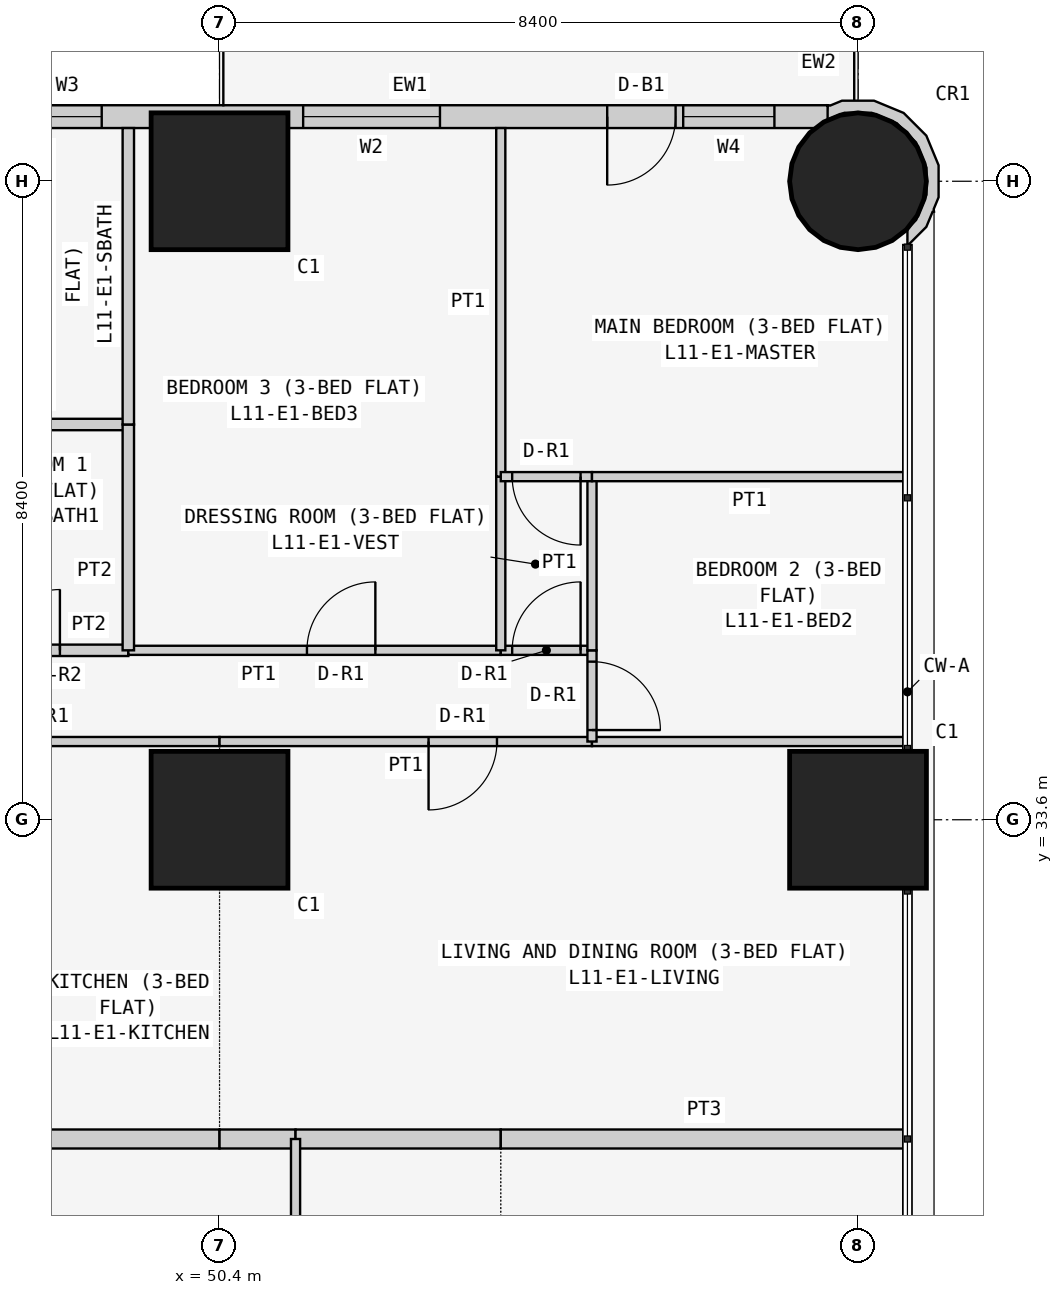
"""IFC4 building model, lengths in metres.
Left out: names, types, materials, properties, quantities, classifications, styles, units other than length and angle.
Written with IfcOpenShell. Run it as: python <this file> out.ifc"""

import sys

from ifc_helpers import new_model, si_unit, direction, frame, frame_2d, origin, origin_2d, place, context, subcontext, project, spatial, polyline, rectangle, circle, outline, extrude, element, fill, save


model = new_model("IFC4")
c1 = context("Model", 3, precision=1e-05, world=origin(), true_north=direction((0.0, 1.0)))
c2 = subcontext(c1, "Body", "Model", "MODEL_VIEW")
j1 = project(units=[si_unit("LENGTHUNIT", "METRE"), si_unit("PLANEANGLEUNIT", "RADIAN")], contexts=[c1])
p1 = place(None, origin())
s1 = spatial("IfcSite", under=j1, at=p1, CompositionType="ELEMENT")
p2 = place(p1, origin())
s2 = spatial("IfcBuilding", under=s1, at=p2, CompositionType="ELEMENT")
p3 = place(p2, frame((0.0, 0.0, 48.9)))
s3 = spatial("IfcBuildingStorey", under=s2, at=p3, CompositionType="ELEMENT", Elevation=48.9)
for number, where, z_axis, x_axis in (
    (1, (50.4, 33.6, 0.0), (0.0, 0.0, 1.0), (1.0, 0.0, 0.0)),
    (2, (50.4, 42.0, 0.0), (0.0, 0.0, 1.0), (1.0, 0.0, 0.0)),
    (3, (58.8, 33.6, 0.0), (0.0, 0.0, 1.0), (1.0, 0.0, 0.0)),
):
    element("IfcColumn", number, at=place(p3, frame(where, z_axis=z_axis, x_axis=x_axis)), inside=s3, PredefinedType="COLUMN", context=c2, shape_type="SweptSolid", body=[
        extrude(rectangle(XDim=1.8, YDim=1.8, at=origin_2d()), origin(), (0.0, 0.0, 1.0), 3.6),
    ])
p4 = place(p3, frame((58.8, 42.0, 0.0), z_axis=(0.0, 0.0, 1.0), x_axis=(1.0, 0.0, 0.0)))
e4 = element("IfcColumn", 4, at=p4, inside=s3, PredefinedType="COLUMN", context=c2, shape_type="SweptSolid", body=[
    extrude(circle(Radius=0.9, at=origin_2d()), origin(), (0.0, 0.0, 1.0), 3.6),
])
p5 = place(p3, frame((58.4, 42.85, 0.0), z_axis=(0.0, 0.0, 1.0), x_axis=(-1.0, 0.0, 0.0)))
e5 = element("IfcWall", 5, at=p5, inside=s3, PredefinedType="SOLIDWALL", context=c2, shape_type="SweptSolid", body=[
    extrude(rectangle(XDim=15.7, YDim=0.3, at=frame_2d((7.85, 0.0))), origin(), (0.0, 0.0, 1.0), 3.45),
])
p6 = place(p5, frame((12.4, 0.0, 0.9)))
e6 = element("IfcOpeningElement", 6, at=p6, cuts=e5, PredefinedType="OPENING", context=c2, shape_type="SweptSolid", body=[
    extrude(rectangle(XDim=1.8, YDim=1.5, at=frame_2d((0.9, 0.75))), frame((0.0, 0.16, 0.0), z_axis=(0.0, -1.0, 0.0), x_axis=(1.0, 0.0, 0.0)), (0.0, 0.0, 1.0), 0.32),
])
p7 = place(p5, frame((9.55, 0.0, 1.5)))
e7 = element("IfcOpeningElement", 7, at=p7, cuts=e5, PredefinedType="OPENING", context=c2, shape_type="SweptSolid", body=[
    extrude(rectangle(XDim=0.9, YDim=0.7, at=frame_2d((0.45, 0.35))), frame((0.0, 0.16, 0.0), z_axis=(0.0, -1.0, 0.0), x_axis=(1.0, 0.0, 0.0)), (0.0, 0.0, 1.0), 0.32),
])
p8 = place(p5, frame((5.1, 0.0, 0.9)))
e8 = element("IfcOpeningElement", 8, at=p8, cuts=e5, PredefinedType="OPENING", context=c2, shape_type="SweptSolid", body=[
    extrude(rectangle(XDim=1.8, YDim=1.5, at=frame_2d((0.9, 0.75))), frame((0.0, 0.16, 0.0), z_axis=(0.0, -1.0, 0.0), x_axis=(1.0, 0.0, 0.0)), (0.0, 0.0, 1.0), 0.32),
])
p9 = place(p5, frame((2.0, 0.0, 0.0)))
e9 = element("IfcOpeningElement", 9, at=p9, cuts=e5, PredefinedType="OPENING", context=c2, shape_type="SweptSolid", body=[
    extrude(rectangle(XDim=0.9, YDim=2.4, at=frame_2d((0.45, 1.2))), frame((0.0, 0.16, 0.0), z_axis=(0.0, -1.0, 0.0), x_axis=(1.0, 0.0, 0.0)), (0.0, 0.0, 1.0), 0.32),
])
p10 = place(p5, frame((0.7, 0.0, 0.9)))
e10 = element("IfcOpeningElement", 10, at=p10, cuts=e5, PredefinedType="OPENING", context=c2, shape_type="SweptSolid", body=[
    extrude(rectangle(XDim=1.2, YDim=1.5, at=frame_2d((0.6, 0.75))), frame((0.0, 0.16, 0.0), z_axis=(0.0, -1.0, 0.0), x_axis=(1.0, 0.0, 0.0)), (0.0, 0.0, 1.0), 0.32),
])
p11 = place(p3, frame((59.411, 41.233, 0.0), z_axis=(0.0, 0.0, 1.0), x_axis=(0.926129809145, 0.377204953059, 0.0)))
e11 = element("IfcWall", 11, at=p11, inside=s3, PredefinedType="SOLIDWALL", context=c2, shape_type="SweptSolid", body=[
    extrude(outline(polyline([(0.626, 0.345), (0.785, 0.736), (0.782, 1.157), (0.619, 1.546), (0.319, 1.843), (-0.072, 2.002), (-0.24, 2.001), (-0.27, 2.017), (-0.37, 1.841), (-0.102, 1.842), (0.23, 1.707), (0.485, 1.455), (0.624, 1.125), (0.626, 0.766), (0.491, 0.434), (0.238, 0.179), (0.09, 0.117), (0.011, -0.078), (0.024, -0.083), (0.329, 0.045), (0.48, 0.198), (0.499, 0.193), (0.508, 0.225), (0.626, 0.345)])), origin(), (0.0, 0.0, 1.0), 3.45),
])
p12 = place(p3, frame((50.4, 34.629, 0.0), z_axis=(0.0, 0.0, 1.0), x_axis=(-1.0, 0.0, 0.0)))
e12 = element("IfcWall", 12, at=p12, inside=s3, PredefinedType="PARTITIONING", context=c2, shape_type="SweptSolid", body=[
    extrude(rectangle(XDim=2.4, YDim=0.12, at=frame_2d((1.2, 0.0))), origin(), (0.0, 0.0, 1.0), 3.45),
])
p13 = place(p3, frame((48.0, 29.4, 0.0), z_axis=(0.0, 0.0, 1.0), x_axis=(1.0, 0.0, 0.0)))
e13 = element("IfcWall", 13, at=p13, inside=s3, PredefinedType="PARTITIONING", context=c2, shape_type="SweptSolid", body=[
    extrude(rectangle(XDim=2.4, YDim=0.25, at=frame_2d((1.2, 0.0))), origin(), (0.0, 0.0, 1.0), 3.45),
])
p14 = place(p3, frame((55.3, 34.629, 0.0), z_axis=(0.0, 0.0, 1.0), x_axis=(-1.0, 0.0, 0.0)))
e14 = element("IfcWall", 14, at=p14, inside=s3, PredefinedType="PARTITIONING", context=c2, shape_type="SweptSolid", body=[
    extrude(rectangle(XDim=4.9, YDim=0.12, at=frame_2d((2.45, 0.0))), origin(), (0.0, 0.0, 1.0), 3.45),
])
p15 = place(p14, frame((1.25, 0.0, 0.0)))
e15 = element("IfcOpeningElement", 15, at=p15, cuts=e14, PredefinedType="OPENING", context=c2, shape_type="SweptSolid", body=[
    extrude(rectangle(XDim=0.9, YDim=2.1, at=frame_2d((0.45, 1.05))), frame((0.0, 0.07, 0.0), z_axis=(0.0, -1.0, 0.0), x_axis=(1.0, 0.0, 0.0)), (0.0, 0.0, 1.0), 0.14),
])
p16 = place(p3, frame((59.45, 34.629, 0.0), z_axis=(0.0, 0.0, 1.0), x_axis=(-1.0, 0.0, 0.0)))
e16 = element("IfcWall", 16, at=p16, inside=s3, PredefinedType="PARTITIONING", context=c2, shape_type="SweptSolid", body=[
    extrude(rectangle(XDim=4.15, YDim=0.12, at=frame_2d((2.075, 0.0))), origin(), (0.0, 0.0, 1.0), 3.45),
])
p17 = place(p3, frame((50.4, 29.4, 0.0), z_axis=(0.0, 0.0, 1.0), x_axis=(1.0, 0.0, 0.0)))
e17 = element("IfcWall", 17, at=p17, inside=s3, PredefinedType="PARTITIONING", context=c2, shape_type="SweptSolid", body=[
    extrude(rectangle(XDim=1.0, YDim=0.25, at=frame_2d((0.5, 0.0))), origin(), (0.0, 0.0, 1.0), 3.45),
])
p18 = place(p3, frame((51.4, 29.4, 0.0), z_axis=(0.0, 0.0, 1.0), x_axis=(1.0, 0.0, 0.0)))
e18 = element("IfcWall", 18, at=p18, inside=s3, PredefinedType="PARTITIONING", context=c2, shape_type="SweptSolid", body=[
    extrude(rectangle(XDim=2.7, YDim=0.25, at=frame_2d((1.35, 0.0))), origin(), (0.0, 0.0, 1.0), 3.45),
])
p19 = place(p3, frame((54.1, 29.4, 0.0), z_axis=(0.0, 0.0, 1.0), x_axis=(1.0, 0.0, 0.0)))
e19 = element("IfcWall", 19, at=p19, inside=s3, PredefinedType="PARTITIONING", context=c2, shape_type="SweptSolid", body=[
    extrude(rectangle(XDim=5.35, YDim=0.25, at=frame_2d((2.675, 0.0))), origin(), (0.0, 0.0, 1.0), 3.45),
])
p20 = place(p3, frame((49.2, 35.829, 0.0), z_axis=(0.0, 0.0, 1.0), x_axis=(-1.0, 0.0, 0.0)))
e20 = element("IfcWall", 20, at=p20, inside=s3, PredefinedType="PARTITIONING", context=c2, shape_type="SweptSolid", body=[
    extrude(rectangle(XDim=2.6, YDim=0.15, at=frame_2d((1.3, 0.0))), origin(), (0.0, 0.0, 1.0), 3.45),
])
p21 = place(p20, frame((0.9, 0.0, 0.0)))
e21 = element("IfcOpeningElement", 21, at=p21, cuts=e20, PredefinedType="OPENING", context=c2, shape_type="SweptSolid", body=[
    extrude(rectangle(XDim=0.8, YDim=2.1, at=frame_2d((0.4, 1.05))), frame((0.0, 0.085, 0.0), z_axis=(0.0, -1.0, 0.0), x_axis=(1.0, 0.0, 0.0)), (0.0, 0.0, 1.0), 0.17),
])
p22 = place(p3, frame((54.1, 35.829, 0.0), z_axis=(0.0, 0.0, 1.0), x_axis=(-1.0, 0.0, 0.0)))
e22 = element("IfcWall", 22, at=p22, inside=s3, PredefinedType="PARTITIONING", context=c2, shape_type="SweptSolid", body=[
    extrude(rectangle(XDim=4.9, YDim=0.12, at=frame_2d((2.45, 0.0))), origin(), (0.0, 0.0, 1.0), 3.45),
])
p23 = place(p22, frame((1.65, 0.0, 0.0)))
e23 = element("IfcOpeningElement", 23, at=p23, cuts=e22, PredefinedType="OPENING", context=c2, shape_type="SweptSolid", body=[
    extrude(rectangle(XDim=0.9, YDim=2.1, at=frame_2d((0.45, 1.05))), frame((0.0, 0.07, 0.0), z_axis=(0.0, -1.0, 0.0), x_axis=(1.0, 0.0, 0.0)), (0.0, 0.0, 1.0), 0.14),
])
p24 = place(p3, frame((55.3, 35.829, 0.0), z_axis=(0.0, 0.0, 1.0), x_axis=(-1.0, 0.0, 0.0)))
e24 = element("IfcWall", 24, at=p24, inside=s3, PredefinedType="PARTITIONING", context=c2, shape_type="SweptSolid", body=[
    extrude(rectangle(XDim=1.2, YDim=0.12, at=frame_2d((0.6, 0.0))), origin(), (0.0, 0.0, 1.0), 3.45),
])
p25 = place(p24, frame((0.15, 0.0, 0.0)))
e25 = element("IfcOpeningElement", 25, at=p25, cuts=e24, PredefinedType="OPENING", context=c2, shape_type="SweptSolid", body=[
    extrude(rectangle(XDim=0.9, YDim=2.1, at=frame_2d((0.45, 1.05))), frame((0.0, 0.07, 0.0), z_axis=(0.0, -1.0, 0.0), x_axis=(1.0, 0.0, 0.0)), (0.0, 0.0, 1.0), 0.14),
])
p26 = place(p3, frame((55.3, 34.629, 0.0), z_axis=(0.0, 0.0, 1.0), x_axis=(0.0, 1.0, 0.0)))
e26 = element("IfcWall", 26, at=p26, inside=s3, PredefinedType="PARTITIONING", context=c2, shape_type="SweptSolid", body=[
    extrude(rectangle(XDim=1.2, YDim=0.12, at=frame_2d((0.6, 0.0))), origin(), (0.0, 0.0, 1.0), 3.45),
])
p27 = place(p26, frame((0.151, 0.0, 0.0)))
e27 = element("IfcOpeningElement", 27, at=p27, cuts=e26, PredefinedType="OPENING", context=c2, shape_type="SweptSolid", body=[
    extrude(rectangle(XDim=0.9, YDim=2.1, at=frame_2d((0.45, 1.05))), frame((0.0, 0.07, 0.0), z_axis=(0.0, -1.0, 0.0), x_axis=(1.0, 0.0, 0.0)), (0.0, 0.0, 1.0), 0.14),
])
p28 = place(p3, frame((49.2, 38.8, 0.0), z_axis=(0.0, 0.0, 1.0), x_axis=(-1.0, 0.0, 0.0)))
e28 = element("IfcWall", 28, at=p28, inside=s3, PredefinedType="PARTITIONING", context=c2, shape_type="SweptSolid", body=[
    extrude(rectangle(XDim=2.6, YDim=0.15, at=frame_2d((1.3, 0.0))), origin(), (0.0, 0.0, 1.0), 3.45),
])
p29 = place(p3, frame((49.2, 35.829, 0.0), z_axis=(0.0, 0.0, 1.0), x_axis=(0.0, 1.0, 0.0)))
e29 = element("IfcWall", 29, at=p29, inside=s3, PredefinedType="PARTITIONING", context=c2, shape_type="SweptSolid", body=[
    extrude(rectangle(XDim=2.971, YDim=0.15, at=frame_2d((1.485, 0.0))), origin(), (0.0, 0.0, 1.0), 3.45),
])
p30 = place(p3, frame((49.2, 38.8, 0.0), z_axis=(0.0, 0.0, 1.0), x_axis=(0.0, 1.0, 0.0)))
e30 = element("IfcWall", 30, at=p30, inside=s3, PredefinedType="PARTITIONING", context=c2, shape_type="SweptSolid", body=[
    extrude(rectangle(XDim=3.9, YDim=0.15, at=frame_2d((1.95, 0.0))), origin(), (0.0, 0.0, 1.0), 3.45),
])
p31 = place(p3, frame((54.1, 35.829, 0.0), z_axis=(0.0, 0.0, 1.0), x_axis=(0.0, 1.0, 0.0)))
e31 = element("IfcWall", 31, at=p31, inside=s3, PredefinedType="PARTITIONING", context=c2, shape_type="SweptSolid", body=[
    extrude(rectangle(XDim=2.285, YDim=0.12, at=frame_2d((1.143, 0.0))), origin(), (0.0, 0.0, 1.0), 3.45),
])
p32 = place(p3, frame((54.1, 38.114, 0.0), z_axis=(0.0, 0.0, 1.0), x_axis=(0.0, 1.0, 0.0)))
e32 = element("IfcWall", 32, at=p32, inside=s3, PredefinedType="PARTITIONING", context=c2, shape_type="SweptSolid", body=[
    extrude(rectangle(XDim=4.586, YDim=0.12, at=frame_2d((2.293, 0.0))), origin(), (0.0, 0.0, 1.0), 3.45),
])
p33 = place(p3, frame((55.3, 35.829, 0.0), z_axis=(0.0, 0.0, 1.0), x_axis=(0.0, 1.0, 0.0)))
e33 = element("IfcWall", 33, at=p33, inside=s3, PredefinedType="PARTITIONING", context=c2, shape_type="SweptSolid", body=[
    extrude(rectangle(XDim=2.285, YDim=0.12, at=frame_2d((1.143, 0.0))), origin(), (0.0, 0.0, 1.0), 3.45),
])
p34 = place(p3, frame((55.3, 38.114, 0.0), z_axis=(0.0, 0.0, 1.0), x_axis=(-1.0, 0.0, 0.0)))
e34 = element("IfcWall", 34, at=p34, inside=s3, PredefinedType="PARTITIONING", context=c2, shape_type="SweptSolid", body=[
    extrude(rectangle(XDim=1.2, YDim=0.12, at=frame_2d((0.6, 0.0))), origin(), (0.0, 0.0, 1.0), 3.45),
])
p35 = place(p34, frame((0.15, 0.0, 0.0)))
e35 = element("IfcOpeningElement", 35, at=p35, cuts=e34, PredefinedType="OPENING", context=c2, shape_type="SweptSolid", body=[
    extrude(rectangle(XDim=0.9, YDim=2.1, at=frame_2d((0.45, 1.05))), frame((0.0, 0.07, 0.0), z_axis=(0.0, -1.0, 0.0), x_axis=(1.0, 0.0, 0.0)), (0.0, 0.0, 1.0), 0.14),
])
p36 = place(p3, frame((59.45, 38.114, 0.0), z_axis=(0.0, 0.0, 1.0), x_axis=(-1.0, 0.0, 0.0)))
e36 = element("IfcWall", 36, at=p36, inside=s3, PredefinedType="PARTITIONING", context=c2, shape_type="SweptSolid", body=[
    extrude(rectangle(XDim=4.15, YDim=0.12, at=frame_2d((2.075, 0.0))), origin(), (0.0, 0.0, 1.0), 3.45),
])
p37 = place(p3, frame((51.4, 29.4, 0.0), z_axis=(0.0, 0.0, 1.0), x_axis=(0.0, -1.0, 0.0)))
e37 = element("IfcWall", 37, at=p37, inside=s3, PredefinedType="PARTITIONING", context=c2, shape_type="SweptSolid", body=[
    extrude(rectangle(XDim=5.229, YDim=0.12, at=frame_2d((2.615, 0.0))), origin(), (0.0, 0.0, 1.0), 3.45),
])
p38 = place(p7, origin())
e38 = element("IfcWindow", 38, at=p38, inside=s3, PartitioningType="SINGLE_PANEL", PredefinedType="WINDOW", context=c2, shape_type="SweptSolid", body=[
    extrude(rectangle(XDim=0.9, YDim=0.7, at=frame_2d((0.45, 0.35))), frame((0.0, 0.03, 0.0), z_axis=(0.0, -1.0, 0.0), x_axis=(1.0, 0.0, 0.0)), (0.0, 0.0, 1.0), 0.06),
])
fill(e7, e38)
p39 = place(p8, origin())
e39 = element("IfcWindow", 39, at=p39, inside=s3, PartitioningType="SINGLE_PANEL", PredefinedType="WINDOW", context=c2, shape_type="SweptSolid", body=[
    extrude(rectangle(XDim=1.8, YDim=1.5, at=frame_2d((0.9, 0.75))), frame((0.0, 0.03, 0.0), z_axis=(0.0, -1.0, 0.0), x_axis=(1.0, 0.0, 0.0)), (0.0, 0.0, 1.0), 0.06),
])
fill(e8, e39)
p40 = place(p9, origin())
e40 = element("IfcDoor", 40, at=p40, inside=s3, OperationType="SINGLE_SWING_RIGHT", PredefinedType="DOOR", context=c2, shape_type="SweptSolid", body=[
    extrude(rectangle(XDim=0.9, YDim=2.4, at=frame_2d((0.45, 1.2))), frame((0.0, 0.025, 0.0), z_axis=(0.0, -1.0, 0.0), x_axis=(1.0, 0.0, 0.0)), (0.0, 0.0, 1.0), 0.05),
])
fill(e9, e40)
p41 = place(p10, origin())
e41 = element("IfcWindow", 41, at=p41, inside=s3, PartitioningType="SINGLE_PANEL", PredefinedType="WINDOW", context=c2, shape_type="SweptSolid", body=[
    extrude(rectangle(XDim=1.2, YDim=1.5, at=frame_2d((0.6, 0.75))), frame((0.0, 0.03, 0.0), z_axis=(0.0, -1.0, 0.0), x_axis=(1.0, 0.0, 0.0)), (0.0, 0.0, 1.0), 0.06),
])
fill(e10, e41)
p42 = place(p15, origin())
e42 = element("IfcDoor", 42, at=p42, inside=s3, OperationType="SINGLE_SWING_RIGHT", PredefinedType="DOOR", context=c2, shape_type="SweptSolid", body=[
    extrude(rectangle(XDim=0.9, YDim=2.1, at=frame_2d((0.45, 1.05))), frame((0.0, 0.025, 0.0), z_axis=(0.0, -1.0, 0.0), x_axis=(1.0, 0.0, 0.0)), (0.0, 0.0, 1.0), 0.05),
])
fill(e15, e42)
p43 = place(p21, frame((0.8, 0.0, 0.0), z_axis=(0.0, 0.0, 1.0), x_axis=(-1.0, 0.0, 0.0)))
e43 = element("IfcDoor", 43, at=p43, inside=s3, OperationType="SINGLE_SWING_RIGHT", PredefinedType="DOOR", context=c2, shape_type="SweptSolid", body=[
    extrude(rectangle(XDim=0.8, YDim=2.1, at=frame_2d((0.4, 1.05))), frame((0.0, 0.025, 0.0), z_axis=(0.0, -1.0, 0.0), x_axis=(1.0, 0.0, 0.0)), (0.0, 0.0, 1.0), 0.05),
])
fill(e21, e43)
p44 = place(p23, frame((0.9, 0.0, 0.0), z_axis=(0.0, 0.0, 1.0), x_axis=(-1.0, 0.0, 0.0)))
e44 = element("IfcDoor", 44, at=p44, inside=s3, OperationType="SINGLE_SWING_RIGHT", PredefinedType="DOOR", context=c2, shape_type="SweptSolid", body=[
    extrude(rectangle(XDim=0.9, YDim=2.1, at=frame_2d((0.45, 1.05))), frame((0.0, 0.025, 0.0), z_axis=(0.0, -1.0, 0.0), x_axis=(1.0, 0.0, 0.0)), (0.0, 0.0, 1.0), 0.05),
])
fill(e23, e44)
p45 = place(p25, frame((0.9, 0.0, 0.0), z_axis=(0.0, 0.0, 1.0), x_axis=(-1.0, 0.0, 0.0)))
e45 = element("IfcDoor", 45, at=p45, inside=s3, OperationType="SINGLE_SWING_RIGHT", PredefinedType="DOOR", context=c2, shape_type="SweptSolid", body=[
    extrude(rectangle(XDim=0.9, YDim=2.1, at=frame_2d((0.45, 1.05))), frame((0.0, 0.025, 0.0), z_axis=(0.0, -1.0, 0.0), x_axis=(1.0, 0.0, 0.0)), (0.0, 0.0, 1.0), 0.05),
])
fill(e25, e45)
p46 = place(p35, origin())
e46 = element("IfcDoor", 46, at=p46, inside=s3, OperationType="SINGLE_SWING_LEFT", PredefinedType="DOOR", context=c2, shape_type="SweptSolid", body=[
    extrude(rectangle(XDim=0.9, YDim=2.1, at=frame_2d((0.45, 1.05))), frame((0.0, 0.025, 0.0), z_axis=(0.0, -1.0, 0.0), x_axis=(1.0, 0.0, 0.0)), (0.0, 0.0, 1.0), 0.05),
])
fill(e35, e46)
p47 = place(p27, frame((0.9, 0.0, 0.0), z_axis=(0.0, 0.0, 1.0), x_axis=(-1.0, 0.0, 0.0)))
e47 = element("IfcDoor", 47, at=p47, inside=s3, OperationType="SINGLE_SWING_RIGHT", PredefinedType="DOOR", context=c2, shape_type="SweptSolid", body=[
    extrude(rectangle(XDim=0.9, YDim=2.1, at=frame_2d((0.45, 1.05))), frame((0.0, 0.025, 0.0), z_axis=(0.0, -1.0, 0.0), x_axis=(1.0, 0.0, 0.0)), (0.0, 0.0, 1.0), 0.05),
])
fill(e27, e47)
save(model, sys.argv[1])
